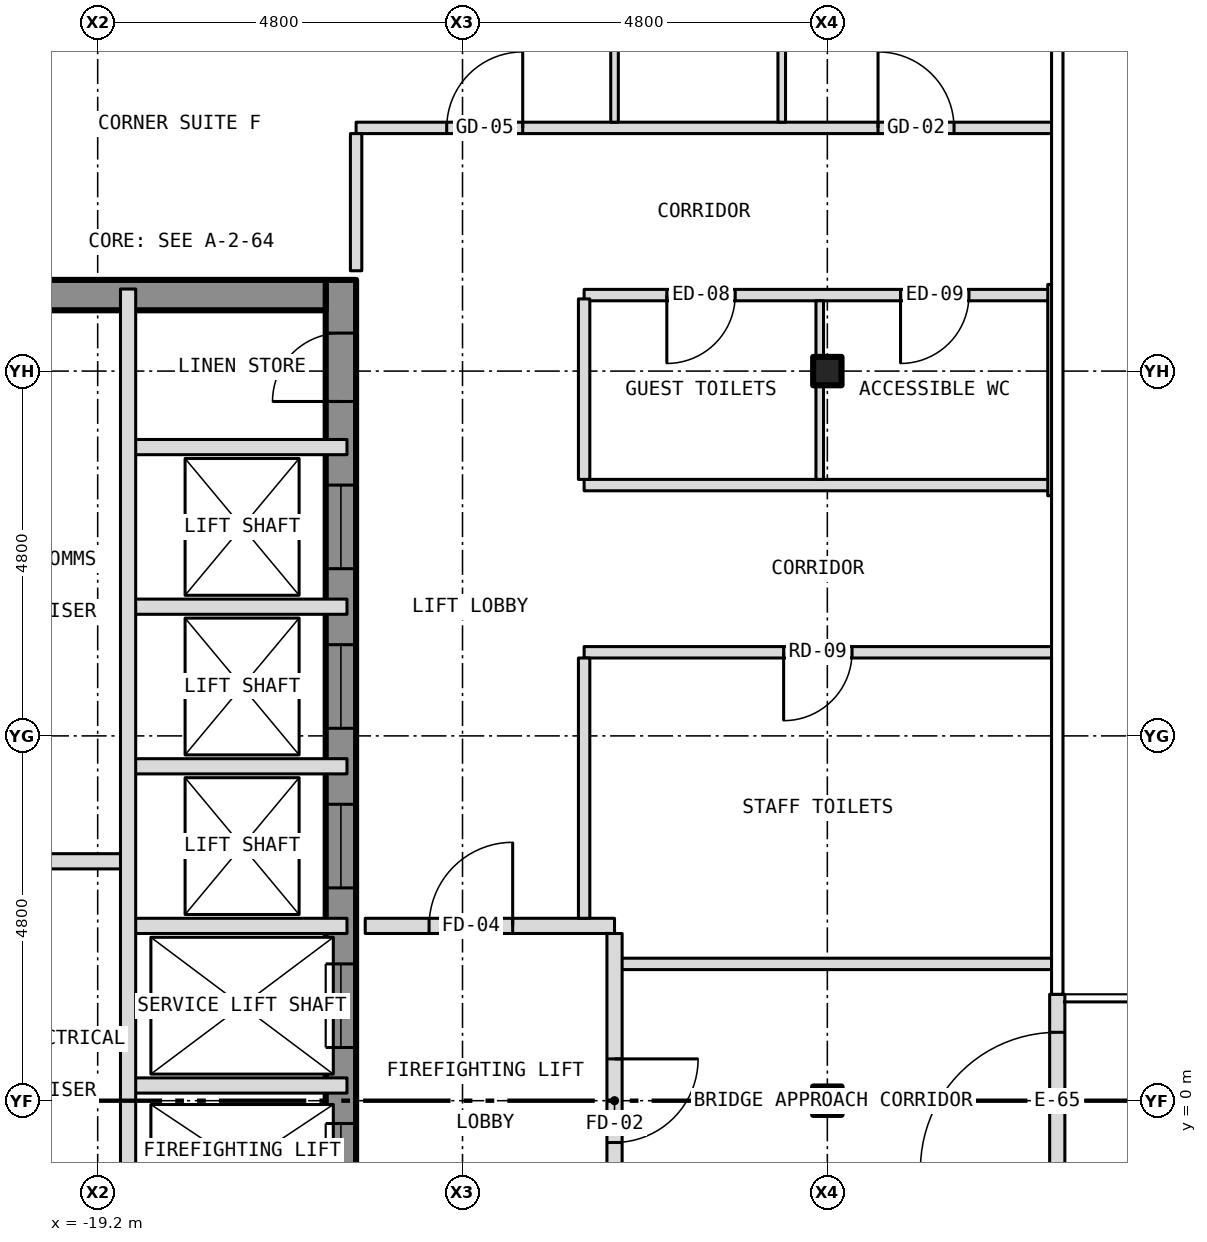
"""IFC4 building model, lengths in metres.
Left out: names, types, materials, properties, quantities, classifications, styles, units other than length and angle.
Written with IfcOpenShell. Run it as: python <this file> out.ifc"""

import sys

from ifc_helpers import new_model, si_unit, direction, frame, frame_2d, origin, origin_2d, place, context, subcontext, project, spatial, rectangle, i_section, extrude, element, fill, save


model = new_model("IFC4")
c1 = context("Model", 3, precision=1e-05, world=origin(), true_north=direction((0.0, 1.0)))
c2 = subcontext(c1, "Body", "Model", "MODEL_VIEW")
j1 = project(units=[si_unit("LENGTHUNIT", "METRE"), si_unit("PLANEANGLEUNIT", "RADIAN")], contexts=[c1])
p1 = place(None, origin())
s1 = spatial("IfcSite", under=j1, at=p1, CompositionType="ELEMENT")
p2 = place(p1, origin())
s2 = spatial("IfcBuilding", under=s1, at=p2, CompositionType="ELEMENT")
p3 = place(p2, frame((0.0, 0.0, 233.0)))
s3 = spatial("IfcBuildingStorey", under=s2, at=p3, CompositionType="ELEMENT", Elevation=233.0)
for number, where, z_axis, x_axis in (
    (1, (-9.6, 0.0, -0.15), (0.0, 0.0, 1.0), (1.0, 0.0, 0.0)),
    (2, (-9.6, 9.6, -0.15), (0.0, 0.0, 1.0), (1.0, 0.0, 0.0)),
):
    element("IfcColumn", number, at=place(p3, frame(where, z_axis=z_axis, x_axis=x_axis)), inside=s3, PredefinedType="COLUMN", context=c2, shape_type="SweptSolid", body=[
        extrude(i_section(OverallWidth=0.373, OverallDepth=0.373, WebThickness=0.016, FlangeThickness=0.026, at=origin_2d()), origin(), (0.0, 0.0, 1.0), 3.35),
    ])
p4 = place(p3, frame((-16.0, -10.8, 0.0), z_axis=(0.0, 0.0, 1.0), x_axis=(0.0, 1.0, 0.0)))
e3 = element("IfcWall", 3, at=p4, inside=s3, PredefinedType="SHEAR", context=c2, shape_type="SweptSolid", body=[
    extrude(rectangle(XDim=21.6, YDim=0.4, at=frame_2d((10.8, 0.0))), origin(), (0.0, 0.0, 1.0), 2.9),
])
p5 = place(p4, frame((9.4, 0.0, 0.0)))
e4 = element("IfcOpeningElement", 4, at=p5, cuts=e3, PredefinedType="OPENING", context=c2, shape_type="SweptSolid", body=[
    extrude(rectangle(XDim=1.1, YDim=2.1, at=frame_2d((0.55, 1.05))), frame((0.0, 0.212, 0.0), z_axis=(0.0, -1.0, 0.0), x_axis=(1.0, 0.0, 0.0)), (0.0, 0.0, 1.0), 0.424),
])
p6 = place(p4, frame((11.5, 0.0, 0.0)))
e5 = element("IfcOpeningElement", 5, at=p6, cuts=e3, PredefinedType="OPENING", context=c2, shape_type="SweptSolid", body=[
    extrude(rectangle(XDim=1.1, YDim=2.1, at=frame_2d((0.55, 1.05))), frame((0.0, 0.212, 0.0), z_axis=(0.0, -1.0, 0.0), x_axis=(1.0, 0.0, 0.0)), (0.0, 0.0, 1.0), 0.424),
])
p7 = place(p4, frame((13.6, 0.0, 0.0)))
e6 = element("IfcOpeningElement", 6, at=p7, cuts=e3, PredefinedType="OPENING", context=c2, shape_type="SweptSolid", body=[
    extrude(rectangle(XDim=1.1, YDim=2.1, at=frame_2d((0.55, 1.05))), frame((0.0, 0.212, 0.0), z_axis=(0.0, -1.0, 0.0), x_axis=(1.0, 0.0, 0.0)), (0.0, 0.0, 1.0), 0.424),
])
p8 = place(p4, frame((15.7, 0.0, 0.0)))
e7 = element("IfcOpeningElement", 7, at=p8, cuts=e3, PredefinedType="OPENING", context=c2, shape_type="SweptSolid", body=[
    extrude(rectangle(XDim=1.1, YDim=2.1, at=frame_2d((0.55, 1.05))), frame((0.0, 0.212, 0.0), z_axis=(0.0, -1.0, 0.0), x_axis=(1.0, 0.0, 0.0)), (0.0, 0.0, 1.0), 0.424),
])
p9 = place(p4, frame((17.8, 0.0, 0.0)))
e8 = element("IfcOpeningElement", 8, at=p9, cuts=e3, PredefinedType="OPENING", context=c2, shape_type="SweptSolid", body=[
    extrude(rectangle(XDim=1.1, YDim=2.1, at=frame_2d((0.55, 1.05))), frame((0.0, 0.212, 0.0), z_axis=(0.0, -1.0, 0.0), x_axis=(1.0, 0.0, 0.0)), (0.0, 0.0, 1.0), 0.424),
])
p10 = place(p4, frame((0.458, 0.0, 0.0)))
e9 = element("IfcOpeningElement", 9, at=p10, cuts=e3, PredefinedType="OPENING", context=c2, shape_type="SweptSolid", body=[
    extrude(rectangle(XDim=1.1, YDim=2.1, at=frame_2d((0.55, 1.05))), frame((0.0, 0.212, 0.0), z_axis=(0.0, -1.0, 0.0), x_axis=(1.0, 0.0, 0.0)), (0.0, 0.0, 1.0), 0.424),
])
p11 = place(p4, frame((7.5, 0.0, 0.0)))
e10 = element("IfcOpeningElement", 10, at=p11, cuts=e3, PredefinedType="OPENING", context=c2, shape_type="SweptSolid", body=[
    extrude(rectangle(XDim=1.1, YDim=2.1, at=frame_2d((0.55, 1.05))), frame((0.0, 0.212, 0.0), z_axis=(0.0, -1.0, 0.0), x_axis=(1.0, 0.0, 0.0)), (0.0, 0.0, 1.0), 0.424),
])
p12 = place(p4, frame((20.0, 0.0, 0.0)))
e11 = element("IfcOpeningElement", 11, at=p12, cuts=e3, PredefinedType="OPENING", context=c2, shape_type="SweptSolid", body=[
    extrude(rectangle(XDim=0.9, YDim=2.1, at=frame_2d((0.45, 1.05))), frame((0.0, 0.212, 0.0), z_axis=(0.0, -1.0, 0.0), x_axis=(1.0, 0.0, 0.0)), (0.0, 0.0, 1.0), 0.424),
])
p13 = place(p3, frame((-20.0, 10.6, 0.0), z_axis=(0.0, 0.0, 1.0), x_axis=(1.0, 0.0, 0.0)))
e12 = element("IfcWall", 12, at=p13, inside=s3, PredefinedType="SHEAR", context=c2, shape_type="SweptSolid", body=[
    extrude(rectangle(XDim=3.8, YDim=0.4, at=frame_2d((1.9, 0.0))), origin(), (0.0, 0.0, 1.0), 2.9),
])
p14 = place(p3, frame((-6.575, -1.4, 0.0), z_axis=(0.0, 0.0, 1.0), x_axis=(0.0, 1.0, 0.0)))
e13 = element("IfcWall", 13, at=p14, inside=s3, PredefinedType="SOLIDWALL", context=c2, shape_type="SweptSolid", body=[
    extrude(rectangle(XDim=2.8, YDim=0.2, at=frame_2d((1.4, 0.0))), origin(), (0.0, 0.0, 1.0), 3.5),
])
p15 = place(p14, frame((0.5, 0.0, 0.0)))
e14 = element("IfcOpeningElement", 14, at=p15, cuts=e13, PredefinedType="OPENING", context=c2, shape_type="SweptSolid", body=[
    extrude(rectangle(XDim=1.8, YDim=2.1, at=frame_2d((0.9, 1.05))), frame((0.0, 0.112, 0.0), z_axis=(0.0, -1.0, 0.0), x_axis=(1.0, 0.0, 0.0)), (0.0, 0.0, 1.0), 0.224),
])
p16 = place(p3, frame((-18.8, 0.2, 0.0), z_axis=(0.0, 0.0, 1.0), x_axis=(1.0, 0.0, 0.0)))
e15 = element("IfcWall", 15, at=p16, inside=s3, PredefinedType="PARTITIONING", context=c2, shape_type="SweptSolid", body=[
    extrude(rectangle(XDim=2.88, YDim=0.2, at=frame_2d((1.44, 0.0))), origin(), (0.0, 0.0, 1.0), 2.9),
])
p17 = place(p3, frame((-12.4, 1.8, 0.0), z_axis=(0.0, 0.0, 1.0), x_axis=(1.0, 0.0, 0.0)))
e16 = element("IfcWall", 16, at=p17, inside=s3, PredefinedType="PARTITIONING", context=c2, shape_type="SweptSolid", body=[
    extrude(rectangle(XDim=5.78, YDim=0.15, at=frame_2d((2.89, 0.0))), origin(), (0.0, 0.0, 1.0), 3.2),
])
p18 = place(p3, frame((-18.8, 2.3, 0.0), z_axis=(0.0, 0.0, 1.0), x_axis=(1.0, 0.0, 0.0)))
e17 = element("IfcWall", 17, at=p18, inside=s3, PredefinedType="PARTITIONING", context=c2, shape_type="SweptSolid", body=[
    extrude(rectangle(XDim=2.88, YDim=0.2, at=frame_2d((1.44, 0.0))), origin(), (0.0, 0.0, 1.0), 2.9),
])
p19 = place(p3, frame((-15.68, 2.3, 0.0), z_axis=(0.0, 0.0, 1.0), x_axis=(1.0, 0.0, 0.0)))
e18 = element("IfcWall", 18, at=p19, inside=s3, PredefinedType="PARTITIONING", context=c2, shape_type="SweptSolid", body=[
    extrude(rectangle(XDim=3.28, YDim=0.2, at=frame_2d((1.64, 0.0))), origin(), (0.0, 0.0, 1.0), 3.2),
])
p20 = place(p19, frame((0.84, 0.0, 0.0)))
e19 = element("IfcOpeningElement", 19, at=p20, cuts=e18, PredefinedType="OPENING", context=c2, shape_type="SweptSolid", body=[
    extrude(rectangle(XDim=1.1, YDim=2.1, at=frame_2d((0.55, 1.05))), frame((0.0, 0.112, 0.0), z_axis=(0.0, -1.0, 0.0), x_axis=(1.0, 0.0, 0.0)), (0.0, 0.0, 1.0), 0.224),
])
p21 = place(p3, frame((-20.28, 3.15, 0.0), z_axis=(0.0, 0.0, 1.0), x_axis=(1.0, 0.0, 0.0)))
e20 = element("IfcWall", 20, at=p21, inside=s3, PredefinedType="PARTITIONING", context=c2, shape_type="SweptSolid", body=[
    extrude(rectangle(XDim=1.48, YDim=0.2, at=frame_2d((0.74, 0.0))), origin(), (0.0, 0.0, 1.0), 2.9),
])
p22 = place(p3, frame((-18.8, 4.4, 0.0), z_axis=(0.0, 0.0, 1.0), x_axis=(1.0, 0.0, 0.0)))
e21 = element("IfcWall", 21, at=p22, inside=s3, PredefinedType="PARTITIONING", context=c2, shape_type="SweptSolid", body=[
    extrude(rectangle(XDim=2.88, YDim=0.2, at=frame_2d((1.44, 0.0))), origin(), (0.0, 0.0, 1.0), 2.9),
])
p23 = place(p3, frame((-12.8, 5.9, 0.0), z_axis=(0.0, 0.0, 1.0), x_axis=(1.0, 0.0, 0.0)))
e22 = element("IfcWall", 22, at=p23, inside=s3, PredefinedType="PARTITIONING", context=c2, shape_type="SweptSolid", body=[
    extrude(rectangle(XDim=6.18, YDim=0.15, at=frame_2d((3.09, 0.0))), origin(), (0.0, 0.0, 1.0), 3.2),
])
p24 = place(p23, frame((2.625, 0.0, 0.0)))
e23 = element("IfcOpeningElement", 23, at=p24, cuts=e22, PredefinedType="OPENING", context=c2, shape_type="SweptSolid", body=[
    extrude(rectangle(XDim=0.9, YDim=2.1, at=frame_2d((0.45, 1.05))), frame((0.0, 0.087, 0.0), z_axis=(0.0, -1.0, 0.0), x_axis=(1.0, 0.0, 0.0)), (0.0, 0.0, 1.0), 0.174),
])
p25 = place(p3, frame((-18.8, 6.5, 0.0), z_axis=(0.0, 0.0, 1.0), x_axis=(1.0, 0.0, 0.0)))
e24 = element("IfcWall", 24, at=p25, inside=s3, PredefinedType="PARTITIONING", context=c2, shape_type="SweptSolid", body=[
    extrude(rectangle(XDim=2.88, YDim=0.2, at=frame_2d((1.44, 0.0))), origin(), (0.0, 0.0, 1.0), 2.9),
])
p26 = place(p3, frame((-12.8, 8.1, 0.0), z_axis=(0.0, 0.0, 1.0), x_axis=(1.0, 0.0, 0.0)))
e25 = element("IfcWall", 25, at=p26, inside=s3, PredefinedType="PARTITIONING", context=c2, shape_type="SweptSolid", body=[
    extrude(rectangle(XDim=6.15, YDim=0.15, at=frame_2d((3.075, 0.0))), origin(), (0.0, 0.0, 1.0), 3.2),
])
p27 = place(p3, frame((-18.8, 8.6, 0.0), z_axis=(0.0, 0.0, 1.0), x_axis=(1.0, 0.0, 0.0)))
e26 = element("IfcWall", 26, at=p27, inside=s3, PredefinedType="PARTITIONING", context=c2, shape_type="SweptSolid", body=[
    extrude(rectangle(XDim=2.88, YDim=0.2, at=frame_2d((1.44, 0.0))), origin(), (0.0, 0.0, 1.0), 2.9),
])
p28 = place(p3, frame((-12.8, 10.6, 0.0), z_axis=(0.0, 0.0, 1.0), x_axis=(1.0, 0.0, 0.0)))
e27 = element("IfcWall", 27, at=p28, inside=s3, PredefinedType="PARTITIONING", context=c2, shape_type="SweptSolid", body=[
    extrude(rectangle(XDim=6.15, YDim=0.15, at=frame_2d((3.075, 0.0))), origin(), (0.0, 0.0, 1.0), 3.2),
])
p29 = place(p28, frame((1.088, 0.0, 0.0)))
e28 = element("IfcOpeningElement", 28, at=p29, cuts=e27, PredefinedType="OPENING", context=c2, shape_type="SweptSolid", body=[
    extrude(rectangle(XDim=0.9, YDim=2.1, at=frame_2d((0.45, 1.05))), frame((0.0, 0.087, 0.0), z_axis=(0.0, -1.0, 0.0), x_axis=(1.0, 0.0, 0.0)), (0.0, 0.0, 1.0), 0.174),
])
p30 = place(p28, frame((4.163, 0.0, 0.0)))
e29 = element("IfcOpeningElement", 29, at=p30, cuts=e27, PredefinedType="OPENING", context=c2, shape_type="SweptSolid", body=[
    extrude(rectangle(XDim=0.9, YDim=2.1, at=frame_2d((0.45, 1.05))), frame((0.0, 0.087, 0.0), z_axis=(0.0, -1.0, 0.0), x_axis=(1.0, 0.0, 0.0)), (0.0, 0.0, 1.0), 0.174),
])
p31 = place(p3, frame((-15.8, 12.8, 0.0), z_axis=(0.0, 0.0, 1.0), x_axis=(1.0, 0.0, 0.0)))
e30 = element("IfcWall", 30, at=p31, inside=s3, PredefinedType="PARTITIONING", context=c2, shape_type="SweptSolid", body=[
    extrude(rectangle(XDim=9.18, YDim=0.15, at=frame_2d((4.59, 0.0))), origin(), (0.0, 0.0, 1.0), 3.2),
])
p32 = place(p31, frame((6.867, 0.0, 0.0)))
e31 = element("IfcOpeningElement", 31, at=p32, cuts=e30, PredefinedType="OPENING", context=c2, shape_type="SweptSolid", body=[
    extrude(rectangle(XDim=1.0, YDim=2.1, at=frame_2d((0.5, 1.05))), frame((0.0, 0.087, 0.0), z_axis=(0.0, -1.0, 0.0), x_axis=(1.0, 0.0, 0.0)), (0.0, 0.0, 1.0), 0.174),
])
p33 = place(p31, frame((1.192, 0.0, 0.0)))
e32 = element("IfcOpeningElement", 32, at=p33, cuts=e30, PredefinedType="OPENING", context=c2, shape_type="SweptSolid", body=[
    extrude(rectangle(XDim=1.0, YDim=2.1, at=frame_2d((0.5, 1.05))), frame((0.0, 0.087, 0.0), z_axis=(0.0, -1.0, 0.0), x_axis=(1.0, 0.0, 0.0)), (0.0, 0.0, 1.0), 0.174),
])
p34 = place(p3, frame((-18.8, -1.8, 0.0), z_axis=(0.0, 0.0, 1.0), x_axis=(0.0, 1.0, 0.0)))
e33 = element("IfcWall", 33, at=p34, inside=s3, PredefinedType="PARTITIONING", context=c2, shape_type="SweptSolid", body=[
    extrude(rectangle(XDim=12.48, YDim=0.2, at=frame_2d((6.24, 0.0))), origin(), (0.0, 0.0, 1.0), 2.9),
])
p35 = place(p3, frame((-15.8, 10.92, 0.0), z_axis=(0.0, 0.0, 1.0), x_axis=(0.0, 1.0, 0.0)))
e34 = element("IfcWall", 34, at=p35, inside=s3, PredefinedType="PARTITIONING", context=c2, shape_type="SweptSolid", body=[
    extrude(rectangle(XDim=1.805, YDim=0.15, at=frame_2d((0.903, 0.0))), origin(), (0.0, 0.0, 1.0), 3.2),
])
p36 = place(p3, frame((-12.8, 2.4, 0.0), z_axis=(0.0, 0.0, 1.0), x_axis=(0.0, 1.0, 0.0)))
e35 = element("IfcWall", 35, at=p36, inside=s3, PredefinedType="PARTITIONING", context=c2, shape_type="SweptSolid", body=[
    extrude(rectangle(XDim=3.425, YDim=0.15, at=frame_2d((1.712, 0.0))), origin(), (0.0, 0.0, 1.0), 3.2),
])
p37 = place(p3, frame((-12.8, 8.175, 0.0), z_axis=(0.0, 0.0, 1.0), x_axis=(0.0, 1.0, 0.0)))
e36 = element("IfcWall", 36, at=p37, inside=s3, PredefinedType="PARTITIONING", context=c2, shape_type="SweptSolid", body=[
    extrude(rectangle(XDim=2.375, YDim=0.15, at=frame_2d((1.188, 0.0))), origin(), (0.0, 0.0, 1.0), 3.2),
])
p38 = place(p3, frame((-12.4, -1.8, 0.0), z_axis=(0.0, 0.0, 1.0), x_axis=(0.0, 1.0, 0.0)))
e37 = element("IfcWall", 37, at=p38, inside=s3, PredefinedType="PARTITIONING", context=c2, shape_type="SweptSolid", body=[
    extrude(rectangle(XDim=4.0, YDim=0.2, at=frame_2d((2.0, 0.0))), origin(), (0.0, 0.0, 1.0), 3.2),
])
p39 = place(p38, frame((1.25, 0.0, 0.0)))
e38 = element("IfcOpeningElement", 38, at=p39, cuts=e37, PredefinedType="OPENING", context=c2, shape_type="SweptSolid", body=[
    extrude(rectangle(XDim=1.1, YDim=2.1, at=frame_2d((0.55, 1.05))), frame((0.0, 0.112, 0.0), z_axis=(0.0, -1.0, 0.0), x_axis=(1.0, 0.0, 0.0)), (0.0, 0.0, 1.0), 0.224),
])
p40 = place(p3, frame((-12.4, 12.875, 0.0), z_axis=(0.0, 0.0, 1.0), x_axis=(0.0, 1.0, 0.0)))
e39 = element("IfcWall", 39, at=p40, inside=s3, PredefinedType="PARTITIONING", context=c2, shape_type="SweptSolid", body=[
    extrude(rectangle(XDim=7.905, YDim=0.1, at=frame_2d((3.953, 0.0))), origin(), (0.0, 0.0, 1.0), 3.2),
])
p41 = place(p3, frame((-10.2, 12.875, 0.0), z_axis=(0.0, 0.0, 1.0), x_axis=(0.0, 1.0, 0.0)))
e40 = element("IfcWall", 40, at=p41, inside=s3, PredefinedType="PARTITIONING", context=c2, shape_type="SweptSolid", body=[
    extrude(rectangle(XDim=3.075, YDim=0.1, at=frame_2d((1.538, 0.0))), origin(), (0.0, 0.0, 1.0), 3.2),
])
p42 = place(p41, frame((1.971, 0.0, 0.0)))
e41 = element("IfcOpeningElement", 41, at=p42, cuts=e40, PredefinedType="OPENING", context=c2, shape_type="SweptSolid", body=[
    extrude(rectangle(XDim=0.9, YDim=2.1, at=frame_2d((0.45, 1.05))), frame((0.0, 0.062, 0.0), z_axis=(0.0, -1.0, 0.0), x_axis=(1.0, 0.0, 0.0)), (0.0, 0.0, 1.0), 0.124),
])
p43 = place(p3, frame((-9.7, 8.175, 0.0), z_axis=(0.0, 0.0, 1.0), x_axis=(0.0, 1.0, 0.0)))
e42 = element("IfcWall", 42, at=p43, inside=s3, PredefinedType="PARTITIONING", context=c2, shape_type="SweptSolid", body=[
    extrude(rectangle(XDim=1.224, YDim=0.1, at=frame_2d((0.612, 0.0))), origin(), (0.0, 0.0, 1.0), 2.578),
])
p44 = place(p3, frame((-9.7, 9.399, 0.0), z_axis=(0.0, 0.0, 1.0), x_axis=(0.0, 1.0, 0.0)))
e43 = element("IfcWall", 43, at=p44, inside=s3, PredefinedType="PARTITIONING", context=c2, shape_type="SweptSolid", body=[
    extrude(rectangle(XDim=0.401, YDim=0.1, at=frame_2d((0.201, 0.0))), origin(), (0.0, 0.0, 1.0), 3.2),
])
p45 = place(p3, frame((-9.7, 9.8, 0.0), z_axis=(0.0, 0.0, 1.0), x_axis=(0.0, 1.0, 0.0)))
e44 = element("IfcWall", 44, at=p45, inside=s3, PredefinedType="PARTITIONING", context=c2, shape_type="SweptSolid", body=[
    extrude(rectangle(XDim=0.725, YDim=0.1, at=frame_2d((0.362, 0.0))), origin(), (0.0, 0.0, 1.0), 2.578),
])
p46 = place(p3, frame((-6.65, 7.96, 0.0), z_axis=(0.0, 0.0, 1.0), x_axis=(0.0, 1.0, 0.0)))
e45 = element("IfcWall", 45, at=p46, inside=s3, PredefinedType="PARTITIONING", context=c2, shape_type="SweptSolid", body=[
    extrude(rectangle(XDim=2.78, YDim=0.1, at=frame_2d((1.39, 0.0))), origin(), (0.0, 0.0, 1.0), 3.2),
])
p47 = place(p15, origin())
e46 = element("IfcDoor", 46, at=p47, inside=s3, OperationType="DOUBLE_DOOR_DOUBLE_SWING", PredefinedType="DOOR", context=c2, shape_type="SweptSolid", body=[
    extrude(rectangle(XDim=1.8, YDim=2.1, at=frame_2d((0.9, 1.05))), frame((0.0, 0.025, 0.0), z_axis=(0.0, -1.0, 0.0), x_axis=(1.0, 0.0, 0.0)), (0.0, 0.0, 1.0), 0.05),
])
fill(e14, e46)
p48 = place(p5, origin())
e47 = element("IfcDoor", 47, at=p48, inside=s3, OperationType="SLIDING_TO_LEFT", PredefinedType="DOOR", context=c2, shape_type="SweptSolid", body=[
    extrude(rectangle(XDim=1.1, YDim=2.1, at=frame_2d((0.55, 1.05))), frame((0.0, 0.025, 0.0), z_axis=(0.0, -1.0, 0.0), x_axis=(1.0, 0.0, 0.0)), (0.0, 0.0, 1.0), 0.05),
])
fill(e4, e47)
p49 = place(p6, origin())
e48 = element("IfcDoor", 48, at=p49, inside=s3, OperationType="SLIDING_TO_LEFT", PredefinedType="DOOR", context=c2, shape_type="SweptSolid", body=[
    extrude(rectangle(XDim=1.1, YDim=2.1, at=frame_2d((0.55, 1.05))), frame((0.0, 0.025, 0.0), z_axis=(0.0, -1.0, 0.0), x_axis=(1.0, 0.0, 0.0)), (0.0, 0.0, 1.0), 0.05),
])
fill(e5, e48)
p50 = place(p7, origin())
e49 = element("IfcDoor", 49, at=p50, inside=s3, OperationType="SLIDING_TO_LEFT", PredefinedType="DOOR", context=c2, shape_type="SweptSolid", body=[
    extrude(rectangle(XDim=1.1, YDim=2.1, at=frame_2d((0.55, 1.05))), frame((0.0, 0.025, 0.0), z_axis=(0.0, -1.0, 0.0), x_axis=(1.0, 0.0, 0.0)), (0.0, 0.0, 1.0), 0.05),
])
fill(e6, e49)
p51 = place(p8, origin())
e50 = element("IfcDoor", 50, at=p51, inside=s3, OperationType="SLIDING_TO_LEFT", PredefinedType="DOOR", context=c2, shape_type="SweptSolid", body=[
    extrude(rectangle(XDim=1.1, YDim=2.1, at=frame_2d((0.55, 1.05))), frame((0.0, 0.025, 0.0), z_axis=(0.0, -1.0, 0.0), x_axis=(1.0, 0.0, 0.0)), (0.0, 0.0, 1.0), 0.05),
])
fill(e7, e50)
p52 = place(p9, origin())
e51 = element("IfcDoor", 51, at=p52, inside=s3, OperationType="SLIDING_TO_LEFT", PredefinedType="DOOR", context=c2, shape_type="SweptSolid", body=[
    extrude(rectangle(XDim=1.1, YDim=2.1, at=frame_2d((0.55, 1.05))), frame((0.0, 0.025, 0.0), z_axis=(0.0, -1.0, 0.0), x_axis=(1.0, 0.0, 0.0)), (0.0, 0.0, 1.0), 0.05),
])
fill(e8, e51)
p53 = place(p12, origin())
e52 = element("IfcDoor", 52, at=p53, inside=s3, OperationType="SINGLE_SWING_LEFT", PredefinedType="DOOR", context=c2, shape_type="SweptSolid", body=[
    extrude(rectangle(XDim=0.9, YDim=2.1, at=frame_2d((0.45, 1.05))), frame((0.0, 0.025, 0.0), z_axis=(0.0, -1.0, 0.0), x_axis=(1.0, 0.0, 0.0)), (0.0, 0.0, 1.0), 0.05),
])
fill(e11, e52)
p54 = place(p39, origin())
e53 = element("IfcDoor", 53, at=p54, inside=s3, OperationType="SINGLE_SWING_RIGHT", PredefinedType="DOOR", context=c2, shape_type="SweptSolid", body=[
    extrude(rectangle(XDim=1.1, YDim=2.1, at=frame_2d((0.55, 1.05))), frame((0.0, 0.025, 0.0), z_axis=(0.0, -1.0, 0.0), x_axis=(1.0, 0.0, 0.0)), (0.0, 0.0, 1.0), 0.05),
])
fill(e38, e53)
p55 = place(p20, origin())
e54 = element("IfcDoor", 54, at=p55, inside=s3, OperationType="SINGLE_SWING_RIGHT", PredefinedType="DOOR", context=c2, shape_type="SweptSolid", body=[
    extrude(rectangle(XDim=1.1, YDim=2.1, at=frame_2d((0.55, 1.05))), frame((0.0, 0.025, 0.0), z_axis=(0.0, -1.0, 0.0), x_axis=(1.0, 0.0, 0.0)), (0.0, 0.0, 1.0), 0.05),
])
fill(e19, e54)
p56 = place(p32, origin())
e55 = element("IfcDoor", 55, at=p56, inside=s3, OperationType="SINGLE_SWING_LEFT", PredefinedType="DOOR", context=c2, shape_type="SweptSolid", body=[
    extrude(rectangle(XDim=1.0, YDim=2.1, at=frame_2d((0.5, 1.05))), frame((0.0, 0.025, 0.0), z_axis=(0.0, -1.0, 0.0), x_axis=(1.0, 0.0, 0.0)), (0.0, 0.0, 1.0), 0.05),
])
fill(e31, e55)
p57 = place(p33, origin())
e56 = element("IfcDoor", 56, at=p57, inside=s3, OperationType="SINGLE_SWING_RIGHT", PredefinedType="DOOR", context=c2, shape_type="SweptSolid", body=[
    extrude(rectangle(XDim=1.0, YDim=2.1, at=frame_2d((0.5, 1.05))), frame((0.0, 0.025, 0.0), z_axis=(0.0, -1.0, 0.0), x_axis=(1.0, 0.0, 0.0)), (0.0, 0.0, 1.0), 0.05),
])
fill(e32, e56)
p58 = place(p29, origin())
e57 = element("IfcDoor", 57, at=p58, inside=s3, OperationType="SINGLE_SWING_LEFT", PredefinedType="DOOR", context=c2, shape_type="SweptSolid", body=[
    extrude(rectangle(XDim=0.9, YDim=2.1, at=frame_2d((0.45, 1.05))), frame((0.0, 0.025, 0.0), z_axis=(0.0, -1.0, 0.0), x_axis=(1.0, 0.0, 0.0)), (0.0, 0.0, 1.0), 0.05),
])
fill(e28, e57)
p59 = place(p30, origin())
e58 = element("IfcDoor", 58, at=p59, inside=s3, OperationType="SINGLE_SWING_LEFT", PredefinedType="DOOR", context=c2, shape_type="SweptSolid", body=[
    extrude(rectangle(XDim=0.9, YDim=2.1, at=frame_2d((0.45, 1.05))), frame((0.0, 0.025, 0.0), z_axis=(0.0, -1.0, 0.0), x_axis=(1.0, 0.0, 0.0)), (0.0, 0.0, 1.0), 0.05),
])
fill(e29, e58)
p60 = place(p24, origin())
e59 = element("IfcDoor", 59, at=p60, inside=s3, OperationType="SINGLE_SWING_LEFT", PredefinedType="DOOR", context=c2, shape_type="SweptSolid", body=[
    extrude(rectangle(XDim=0.9, YDim=2.1, at=frame_2d((0.45, 1.05))), frame((0.0, 0.025, 0.0), z_axis=(0.0, -1.0, 0.0), x_axis=(1.0, 0.0, 0.0)), (0.0, 0.0, 1.0), 0.05),
])
fill(e23, e59)
save(model, sys.argv[1])
